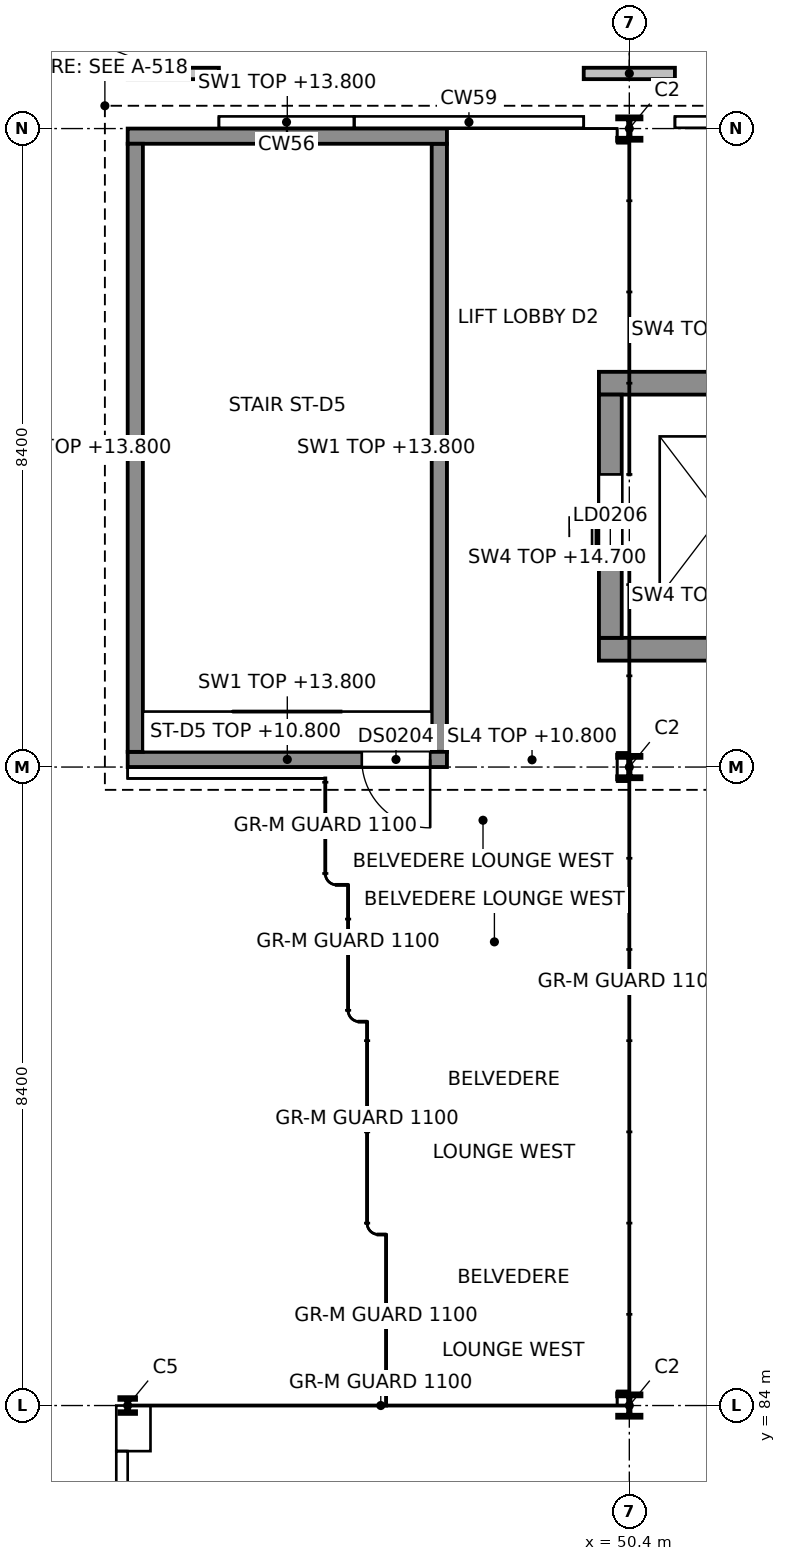
"""IFC4 building model, lengths in metres.
Left out: names, types, materials, properties, quantities, classifications, styles, units other than length and angle.
Written with IfcOpenShell. Run it as: python <this file> out.ifc"""

import sys

from ifc_helpers import new_model, si_unit, direction, frame, frame_2d, origin, origin_2d, place, context, subcontext, project, spatial, rectangle, i_section, extrude, element, fill, save


model = new_model("IFC4")
c1 = context("Model", 3, precision=1e-05, world=origin(), true_north=direction((0.0, 1.0)))
c2 = subcontext(c1, "Body", "Model", "MODEL_VIEW")
j1 = project(units=[si_unit("LENGTHUNIT", "METRE"), si_unit("PLANEANGLEUNIT", "RADIAN")], contexts=[c1])
p1 = place(None, origin())
s1 = spatial("IfcSite", under=j1, at=p1, CompositionType="ELEMENT")
p2 = place(p1, origin())
s2 = spatial("IfcBuilding", under=s1, at=p2, CompositionType="ELEMENT")
p3 = place(p2, frame((0.0, 0.0, 10.8)))
s3 = spatial("IfcBuildingStorey", under=s2, at=p3, CompositionType="ELEMENT", Elevation=10.8)
p4 = place(p3, frame((43.8, 84.0, 0.0), z_axis=(0.0, 0.0, 1.0), x_axis=(1.0, 0.0, 0.0)))
e1 = element("IfcColumn", 1, at=p4, inside=s3, PredefinedType="COLUMN", context=c2, shape_type="SweptSolid", body=[
    extrude(i_section(OverallWidth=0.2, OverallDepth=0.2, WebThickness=0.009, FlangeThickness=0.015, at=origin_2d()), origin(), (0.0, 0.0, 1.0), 4.2),
])
for number, where, z_axis, x_axis in (
    (2, (50.4, 84.0, 0.0), (0.0, 0.0, 1.0), (1.0, 0.0, 0.0)),
    (3, (50.4, 92.4, 0.0), (0.0, 0.0, 1.0), (1.0, 0.0, 0.0)),
    (4, (50.4, 100.8, 0.0), (0.0, 0.0, 1.0), (1.0, 0.0, 0.0)),
):
    element("IfcColumn", number, at=place(p3, frame(where, z_axis=z_axis, x_axis=x_axis)), inside=s3, PredefinedType="COLUMN", context=c2, shape_type="SweptSolid", body=[
        extrude(i_section(OverallWidth=0.3, OverallDepth=0.3, WebThickness=0.011, FlangeThickness=0.019, at=origin_2d()), origin(), (0.0, 0.0, 1.0), 4.2),
    ])
p5 = place(p3, frame((43.8, 92.5, 0.0), z_axis=(0.0, 0.0, 1.0), x_axis=(1.0, 0.0, 0.0)))
e5 = element("IfcWall", 5, at=p5, inside=s3, PredefinedType="SHEAR", context=c2, shape_type="SweptSolid", body=[
    extrude(rectangle(XDim=4.2, YDim=0.2, at=frame_2d((2.1, 0.0))), origin(), (0.0, 0.0, 1.0), 3.0),
])
p6 = place(p5, frame((3.08, 0.0, 0.0)))
e6 = element("IfcOpeningElement", 6, at=p6, cuts=e5, PredefinedType="OPENING", context=c2, shape_type="SweptSolid", body=[
    extrude(rectangle(XDim=0.9, YDim=2.0, at=frame_2d((0.45, 1.0))), frame((0.0, 0.1, 0.0), z_axis=(0.0, -1.0, 0.0), x_axis=(1.0, 0.0, 0.0)), (0.0, 0.0, 1.0), 0.2),
])
p7 = place(p3, frame((43.8, 100.7, 0.0), z_axis=(0.0, 0.0, 1.0), x_axis=(1.0, 0.0, 0.0)))
e7 = element("IfcWall", 7, at=p7, inside=s3, PredefinedType="SHEAR", context=c2, shape_type="SweptSolid", body=[
    extrude(rectangle(XDim=4.2, YDim=0.2, at=frame_2d((2.1, 0.0))), origin(), (0.0, 0.0, 1.0), 3.0),
])
for number, where, z_axis, x_axis in (
    (8, (43.9, 92.6, 0.0), (0.0, 0.0, 1.0), (0.0, 1.0, 0.0)),
    (9, (47.9, 92.6, 0.0), (0.0, 0.0, 1.0), (0.0, 1.0, 0.0)),
):
    element("IfcWall", number, at=place(p3, frame(where, z_axis=z_axis, x_axis=x_axis)), inside=s3, PredefinedType="SHEAR", context=c2, shape_type="SweptSolid", body=[
        extrude(rectangle(XDim=8.0, YDim=0.2, at=frame_2d((4.0, 0.0))), origin(), (0.0, 0.0, 1.0), 3.0),
    ])
for number, where, z_axis, x_axis in (
    (10, (50.0, 93.95, 0.0), (0.0, 0.0, 1.0), (1.0, 0.0, 0.0)),
    (11, (50.0, 97.45, 0.0), (0.0, 0.0, 1.0), (1.0, 0.0, 0.0)),
):
    element("IfcWall", number, at=place(p3, frame(where, z_axis=z_axis, x_axis=x_axis)), inside=s3, PredefinedType="SHEAR", context=c2, shape_type="SweptSolid", body=[
        extrude(rectangle(XDim=3.2, YDim=0.3, at=frame_2d((1.6, 0.0))), origin(), (0.0, 0.0, 1.0), 3.9),
    ])
p8 = place(p3, frame((50.15, 94.1, 0.0), z_axis=(0.0, 0.0, 1.0), x_axis=(0.0, 1.0, 0.0)))
e12 = element("IfcWall", 12, at=p8, inside=s3, PredefinedType="SHEAR", context=c2, shape_type="SweptSolid", body=[
    extrude(rectangle(XDim=3.2, YDim=0.3, at=frame_2d((1.6, 0.0))), origin(), (0.0, 0.0, 1.0), 3.9),
])
p9 = place(p8, frame((1.05, 0.0, 0.0)))
e13 = element("IfcOpeningElement", 13, at=p9, cuts=e12, PredefinedType="OPENING", context=c2, shape_type="SweptSolid", body=[
    extrude(rectangle(XDim=1.1, YDim=2.1, at=frame_2d((0.55, 1.05))), frame((0.0, 0.15, 0.0), z_axis=(0.0, -1.0, 0.0), x_axis=(1.0, 0.0, 0.0)), (0.0, 0.0, 1.0), 0.3),
])
p10 = place(p2, frame((0.0, 0.0, 6.0)))
s4 = spatial("IfcBuildingStorey", under=s2, at=p10, CompositionType="ELEMENT", Elevation=6.0)
p11 = place(p10, frame((43.875, 83.4, 0.0), z_axis=(0.0, 0.0, 1.0), x_axis=(0.0, 1.0, 0.0)))
e14 = element("IfcWall", 14, at=p11, inside=s4, PredefinedType="SOLIDWALL", context=c2, shape_type="SweptSolid", body=[
    extrude(rectangle(XDim=0.6, YDim=0.45, at=frame_2d((0.3, 0.0))), origin(), (0.0, 0.0, 1.0), 20.75),
])
for number, where, z_axis, x_axis in (
    (15, (43.8, 101.525, 0.0), (0.0, 0.0, 1.0), (1.0, 0.0, 0.0)),
    (16, (49.8, 101.525, 0.0), (0.0, 0.0, 1.0), (1.0, 0.0, 0.0)),
):
    element("IfcWall", number, at=place(p3, frame(where, z_axis=z_axis, x_axis=x_axis)), inside=s3, PredefinedType="SOLIDWALL", context=c2, shape_type="SweptSolid", body=[
        extrude(rectangle(XDim=1.2, YDim=0.15, at=frame_2d((0.6, 0.0))), origin(), (0.0, 0.0, 1.0), 4.2),
    ])
p12 = place(p6, origin())
e17 = element("IfcDoor", 17, at=p12, inside=s3, OperationType="SINGLE_SWING_RIGHT", PredefinedType="DOOR", context=c2, shape_type="SweptSolid", body=[
    extrude(rectangle(XDim=0.9, YDim=2.0, at=frame_2d((0.45, 1.0))), frame((0.0, 0.025, 0.0), z_axis=(0.0, -1.0, 0.0), x_axis=(1.0, 0.0, 0.0)), (0.0, 0.0, 1.0), 0.05),
])
fill(e6, e17)
p13 = place(p9, origin())
e18 = element("IfcDoor", 18, at=p13, inside=s3, OperationType="SLIDING_TO_RIGHT", PredefinedType="DOOR", context=c2, shape_type="SweptSolid", body=[
    extrude(rectangle(XDim=1.1, YDim=2.1, at=frame_2d((0.55, 1.05))), frame((0.0, 0.025, 0.0), z_axis=(0.0, -1.0, 0.0), x_axis=(1.0, 0.0, 0.0)), (0.0, 0.0, 1.0), 0.05),
])
fill(e13, e18)
save(model, sys.argv[1])
